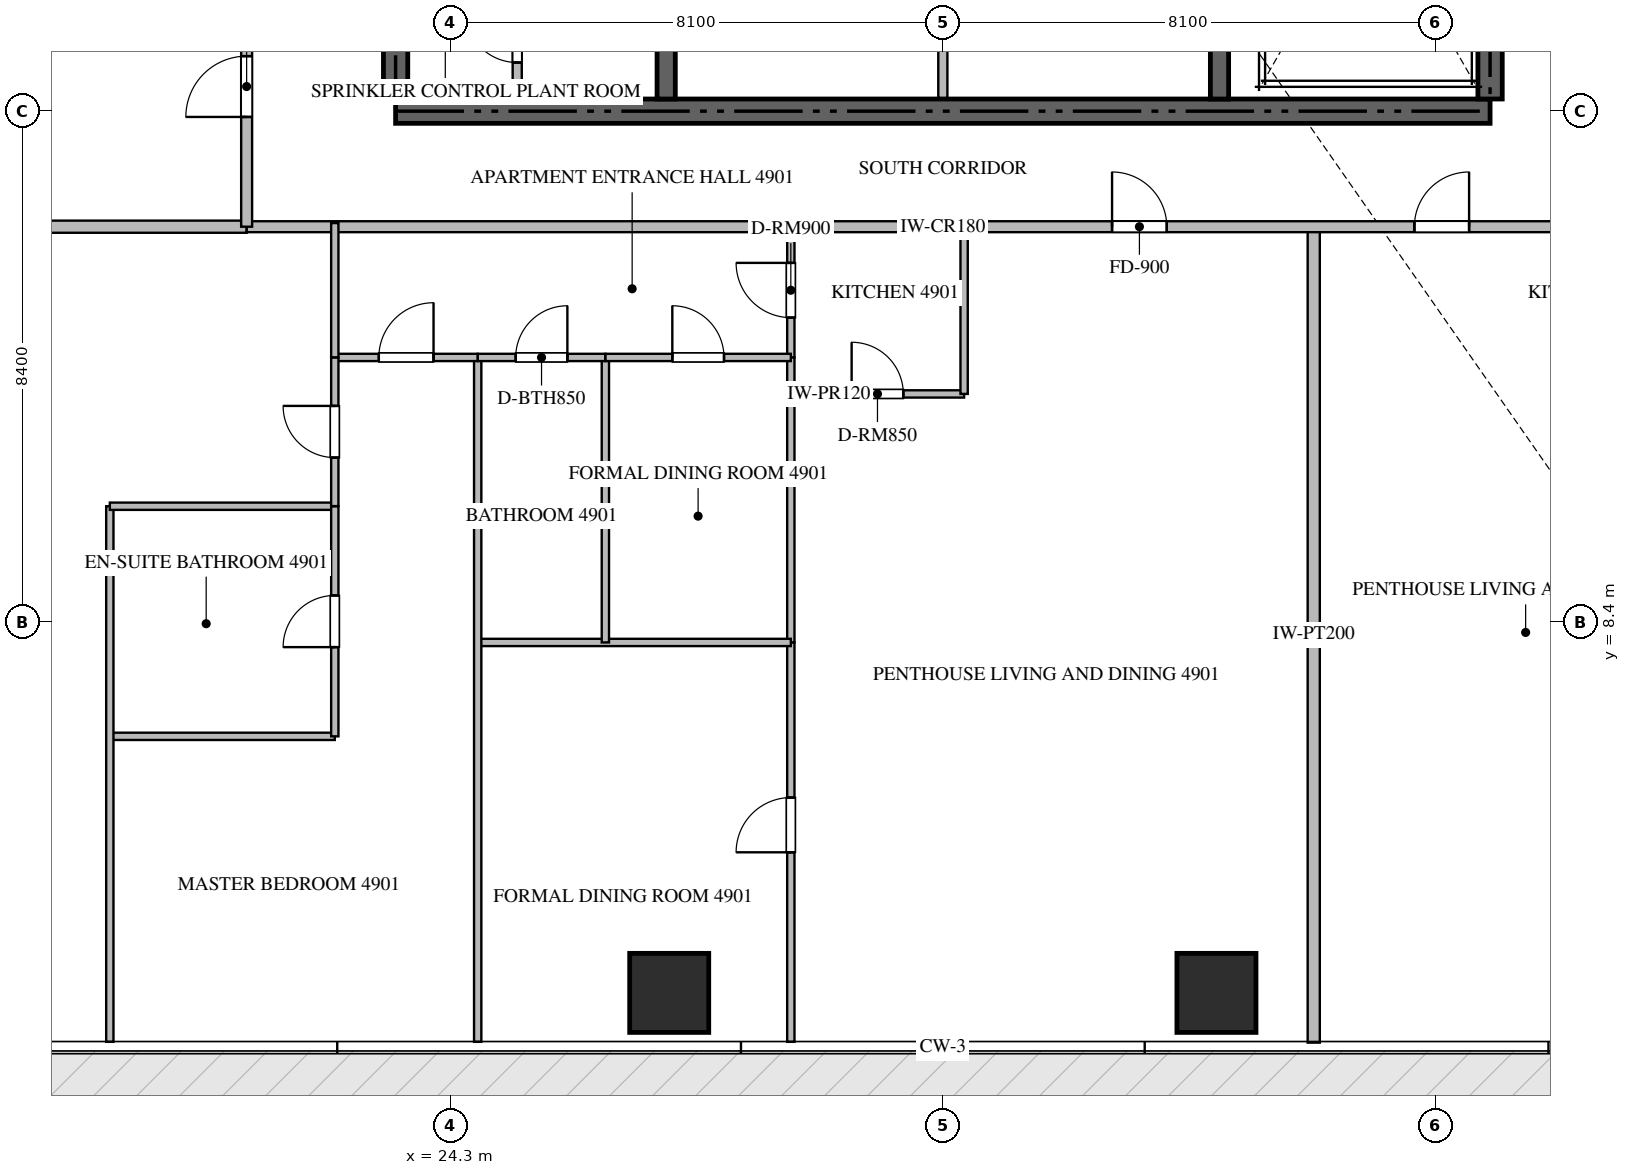
"""IFC4 building model, lengths in metres.
Left out: names, types, materials, properties, quantities, classifications, styles, units other than length and angle.
Written with IfcOpenShell. Run it as: python <this file> out.ifc"""

import sys

from ifc_helpers import new_model, si_unit, direction, frame, frame_2d, origin, origin_2d, place, context, subcontext, project, spatial, rectangle, extrude, source, transform, mapped, element, fill, save


model = new_model("IFC4")
c1 = context("Model", 3, precision=1e-05, world=origin(), true_north=direction((0.0, 1.0)))
c2 = subcontext(c1, "Body", "Model", "MODEL_VIEW")
j1 = project(units=[si_unit("LENGTHUNIT", "METRE"), si_unit("PLANEANGLEUNIT", "RADIAN")], contexts=[c1])
p1 = place(None, origin())
s1 = spatial("IfcSite", under=j1, at=p1, CompositionType="ELEMENT")
p2 = place(p1, origin())
s2 = spatial("IfcBuilding", under=s1, at=p2, CompositionType="ELEMENT")
p3 = place(p2, frame((0.0, 0.0, 195.15)))
s3 = spatial("IfcBuildingStorey", under=s2, at=p3, CompositionType="ELEMENT", Elevation=195.15)
p4 = place(p3, frame((23.4, 16.8, -0.26), z_axis=(0.0, 0.0, 1.0), x_axis=(1.0, 0.0, 0.0)))
e1 = element("IfcWall", 1, at=p4, inside=s3, PredefinedType="SHEAR", context=c2, shape_type="SweptSolid", body=[
    extrude(rectangle(XDim=18.0, YDim=0.4, at=frame_2d((9.0, 0.0))), origin(), (0.0, 0.0, 1.0), 3.568),
])
p5 = place(p3, frame((23.4, 17.0, -0.26), z_axis=(0.0, 0.0, 1.0), x_axis=(0.0, 1.0, 0.0)))
e2 = element("IfcWall", 2, at=p5, inside=s3, PredefinedType="SHEAR", context=c2, shape_type="SweptSolid", body=[
    extrude(rectangle(XDim=4.85, YDim=0.4, at=frame_2d((2.425, 0.0))), origin(), (0.0, 0.0, 1.0), 3.568),
])
p6 = place(p3, frame((41.4, 17.0, -0.26), z_axis=(0.0, 0.0, 1.0), x_axis=(0.0, 1.0, 0.0)))
e3 = element("IfcWall", 3, at=p6, inside=s3, PredefinedType="SHEAR", context=c2, shape_type="SweptSolid", body=[
    extrude(rectangle(XDim=8.35, YDim=0.4, at=frame_2d((4.175, 0.0))), origin(), (0.0, 0.0, 1.0), 3.568),
])
p7 = place(p3, frame((27.85, 17.0, -0.26), z_axis=(0.0, 0.0, 1.0), x_axis=(0.0, 1.0, 0.0)))
e4 = element("IfcWall", 4, at=p7, inside=s3, PredefinedType="SHEAR", context=c2, shape_type="SweptSolid", body=[
    extrude(rectangle(XDim=4.85, YDim=0.3, at=frame_2d((2.425, 0.0))), origin(), (0.0, 0.0, 1.0), 3.568),
])
p8 = place(p3, frame((36.95, 17.0, -0.26), z_axis=(0.0, 0.0, 1.0), x_axis=(0.0, 1.0, 0.0)))
e5 = element("IfcWall", 5, at=p8, inside=s3, PredefinedType="SHEAR", context=c2, shape_type="SweptSolid", body=[
    extrude(rectangle(XDim=8.35, YDim=0.3, at=frame_2d((4.175, 0.0))), origin(), (0.0, 0.0, 1.0), 3.568),
])
m1 = source(origin(), c2, "Body", "SweptSolid", [
    extrude(rectangle(XDim=1.3, YDim=1.3, at=origin_2d()), origin(), (0.0, 0.0, 1.0), 3.57),
])
for number, where, z_axis, x_axis in (
    (6, (27.9, 2.3, -0.26), (0.0, 0.0, 1.0), (1.0, 0.0, 0.0)),
    (7, (36.9, 2.3, -0.26), (0.0, 0.0, 1.0), (1.0, 0.0, 0.0)),
):
    element("IfcColumn", number, at=place(p3, frame(where, z_axis=z_axis, x_axis=x_axis)), inside=s3, PredefinedType="COLUMN", context=c2, shape_type="MappedRepresentation", body=[
        mapped(m1, transform((0.0, 0.0, 0.0), scale=1.0)),
    ])
p9 = place(p3, frame((25.4, 17.0, 0.0), z_axis=(0.0, 0.0, 1.0), x_axis=(0.0, 1.0, 0.0)))
e8 = element("IfcWall", 8, at=p9, inside=s3, PredefinedType="PARTITIONING", context=c2, shape_type="SweptSolid", body=[
    extrude(rectangle(XDim=2.05, YDim=0.15, at=frame_2d((1.025, 0.0))), origin(), (0.0, 0.0, 1.0), 3.31),
])
p10 = place(p9, frame((0.6, 0.0, 0.0)))
e9 = element("IfcOpeningElement", 9, at=p10, cuts=e8, PredefinedType="OPENING", context=c2, shape_type="SweptSolid", body=[
    extrude(rectangle(XDim=0.85, YDim=2.1, at=frame_2d((0.425, 1.05))), frame((0.0, 0.085, 0.0), z_axis=(0.0, -1.0, 0.0), x_axis=(1.0, 0.0, 0.0)), (0.0, 0.0, 1.0), 0.17),
])
p11 = place(p3, frame((32.4, 17.02, 0.0), z_axis=(0.0, 0.0, 1.0), x_axis=(0.0, 1.0, 0.0)))
e10 = element("IfcWall", 10, at=p11, inside=s3, PredefinedType="PARTITIONING", context=c2, shape_type="SweptSolid", body=[
    extrude(rectangle(XDim=2.73, YDim=0.15, at=frame_2d((1.365, 0.0))), origin(), (0.0, 0.0, 1.0), 3.31),
])
p12 = place(p3, frame((38.5, 1.482, 0.0), z_axis=(0.0, 0.0, 1.0), x_axis=(0.0, 1.0, 0.0)))
e11 = element("IfcWall", 11, at=p12, inside=s3, PredefinedType="PARTITIONING", context=c2, shape_type="SweptSolid", body=[
    extrude(rectangle(XDim=13.418, YDim=0.2, at=frame_2d((6.709, 0.0))), origin(), (0.0, 0.0, 1.0), 3.31),
])
p13 = place(p3, frame((7.882, 14.9, 0.0), z_axis=(0.0, 0.0, 1.0), x_axis=(1.0, 0.0, 0.0)))
e12 = element("IfcWall", 12, at=p13, inside=s3, PredefinedType="PARTITIONING", context=c2, shape_type="SweptSolid", body=[
    extrude(rectangle(XDim=13.068, YDim=0.2, at=frame_2d((6.534, 0.0))), origin(), (0.0, 0.0, 1.0), 3.31),
])
p14 = place(p3, frame((20.952, 14.9, 0.0), z_axis=(0.0, 0.0, 1.0), x_axis=(1.0, 0.0, 0.0)))
e13 = element("IfcWall", 13, at=p14, inside=s3, PredefinedType="PARTITIONING", context=c2, shape_type="SweptSolid", body=[
    extrude(rectangle(XDim=22.896, YDim=0.18, at=frame_2d((11.448, 0.0))), origin(), (0.0, 0.0, 1.0), 2.145),
])
p15 = place(p14, frame((14.231, 0.0, 0.0)))
e14 = element("IfcOpeningElement", 14, at=p15, cuts=e13, PredefinedType="OPENING", context=c2, shape_type="SweptSolid", body=[
    extrude(rectangle(XDim=0.9, YDim=2.1, at=frame_2d((0.45, 1.05))), frame((0.0, 0.1, 0.0), z_axis=(0.0, -1.0, 0.0), x_axis=(1.0, 0.0, 0.0)), (0.0, 0.0, 1.0), 0.2),
])
p16 = place(p14, frame((19.203, 0.0, 0.0)))
e15 = element("IfcOpeningElement", 15, at=p16, cuts=e13, PredefinedType="OPENING", context=c2, shape_type="SweptSolid", body=[
    extrude(rectangle(XDim=0.9, YDim=2.1, at=frame_2d((0.45, 1.05))), frame((0.0, 0.1, 0.0), z_axis=(0.0, -1.0, 0.0), x_axis=(1.0, 0.0, 0.0)), (0.0, 0.0, 1.0), 0.2),
])
p17 = place(p3, frame((20.95, 14.9, 0.0), z_axis=(0.0, 0.0, 1.0), x_axis=(0.0, 1.0, 0.0)))
e16 = element("IfcWall", 16, at=p17, inside=s3, PredefinedType="PARTITIONING", context=c2, shape_type="SweptSolid", body=[
    extrude(rectangle(XDim=18.7, YDim=0.18, at=frame_2d((9.35, 0.0))), origin(), (0.0, 0.0, 1.0), 3.31),
])
p18 = place(p17, frame((1.805, 0.0, 0.0)))
e17 = element("IfcOpeningElement", 17, at=p18, cuts=e16, PredefinedType="OPENING", context=c2, shape_type="SweptSolid", body=[
    extrude(rectangle(XDim=1.0, YDim=2.15, at=frame_2d((0.5, 1.075))), frame((0.0, 0.1, 0.0), z_axis=(0.0, -1.0, 0.0), x_axis=(1.0, 0.0, 0.0)), (0.0, 0.0, 1.0), 0.2),
])
p19 = place(p17, frame((10.602, 0.0, 0.0)))
e18 = element("IfcOpeningElement", 18, at=p19, cuts=e16, PredefinedType="OPENING", context=c2, shape_type="SweptSolid", body=[
    extrude(rectangle(XDim=1.0, YDim=2.15, at=frame_2d((0.5, 1.075))), frame((0.0, 0.1, 0.0), z_axis=(0.0, -1.0, 0.0), x_axis=(1.0, 0.0, 0.0)), (0.0, 0.0, 1.0), 0.2),
])
p20 = place(p3, frame((29.9, 12.15, 0.0), z_axis=(0.0, 0.0, 1.0), x_axis=(1.0, 0.0, 0.0)))
e19 = element("IfcWall", 19, at=p20, inside=s3, PredefinedType="PARTITIONING", context=c2, shape_type="SweptSolid", body=[
    extrude(rectangle(XDim=2.85, YDim=0.12, at=frame_2d((1.425, 0.0))), origin(), (0.0, 0.0, 1.0), 3.31),
])
p21 = place(p20, frame((1.0, 0.0, 0.0)))
e20 = element("IfcOpeningElement", 20, at=p21, cuts=e19, PredefinedType="OPENING", context=c2, shape_type="SweptSolid", body=[
    extrude(rectangle(XDim=0.85, YDim=2.1, at=frame_2d((0.425, 1.05))), frame((0.0, 0.07, 0.0), z_axis=(0.0, -1.0, 0.0), x_axis=(1.0, 0.0, 0.0)), (0.0, 0.0, 1.0), 0.14),
])
p22 = place(p3, frame((32.75, 12.15, 0.0), z_axis=(0.0, 0.0, 1.0), x_axis=(0.0, 1.0, 0.0)))
e21 = element("IfcWall", 21, at=p22, inside=s3, PredefinedType="PARTITIONING", context=c2, shape_type="SweptSolid", body=[
    extrude(rectangle(XDim=2.81, YDim=0.12, at=frame_2d((1.405, 0.0))), origin(), (0.0, 0.0, 1.0), 3.31),
])
p23 = place(p3, frame((29.9, 12.75, 0.0), z_axis=(0.0, 0.0, 1.0), x_axis=(0.0, 1.0, 0.0)))
e22 = element("IfcWall", 22, at=p23, inside=s3, PredefinedType="PARTITIONING", context=c2, shape_type="SweptSolid", body=[
    extrude(rectangle(XDim=2.21, YDim=0.12, at=frame_2d((1.105, 0.0))), origin(), (0.0, 0.0, 1.0), 3.31),
])
p24 = place(p23, frame((0.655, 0.0, 0.0)))
e23 = element("IfcOpeningElement", 23, at=p24, cuts=e22, PredefinedType="OPENING", context=c2, shape_type="SweptSolid", body=[
    extrude(rectangle(XDim=0.9, YDim=2.1, at=frame_2d((0.45, 1.05))), frame((0.0, 0.07, 0.0), z_axis=(0.0, -1.0, 0.0), x_axis=(1.0, 0.0, 0.0)), (0.0, 0.0, 1.0), 0.14),
])
p25 = place(p3, frame((29.9, 1.495, 0.0), z_axis=(0.0, 0.0, 1.0), x_axis=(0.0, 1.0, 0.0)))
e24 = element("IfcWall", 24, at=p25, inside=s3, PredefinedType="PARTITIONING", context=c2, shape_type="SweptSolid", body=[
    extrude(rectangle(XDim=6.568, YDim=0.12, at=frame_2d((3.284, 0.0))), origin(), (0.0, 0.0, 1.0), 3.31),
])
p26 = place(p25, frame((3.117, 0.0, 0.0)))
e25 = element("IfcOpeningElement", 25, at=p26, cuts=e24, PredefinedType="OPENING", context=c2, shape_type="SweptSolid", body=[
    extrude(rectangle(XDim=0.9, YDim=2.1, at=frame_2d((0.45, 1.05))), frame((0.0, 0.07, 0.0), z_axis=(0.0, -1.0, 0.0), x_axis=(1.0, 0.0, 0.0)), (0.0, 0.0, 1.0), 0.14),
])
p27 = place(p3, frame((29.9, 8.065, 0.0), z_axis=(0.0, 0.0, 1.0), x_axis=(0.0, 1.0, 0.0)))
e26 = element("IfcWall", 26, at=p27, inside=s3, PredefinedType="PARTITIONING", context=c2, shape_type="SweptSolid", body=[
    extrude(rectangle(XDim=4.683, YDim=0.12, at=frame_2d((2.342, 0.0))), origin(), (0.0, 0.0, 1.0), 3.31),
])
p28 = place(p3, frame((24.75, 8.063, 0.0), z_axis=(0.0, 0.0, 1.0), x_axis=(1.0, 0.0, 0.0)))
e27 = element("IfcWall", 27, at=p28, inside=s3, PredefinedType="PARTITIONING", context=c2, shape_type="SweptSolid", body=[
    extrude(rectangle(XDim=5.15, YDim=0.12, at=frame_2d((2.575, 0.0))), origin(), (0.0, 0.0, 1.0), 3.31),
])
p29 = place(p3, frame((24.75, 1.495, 0.0), z_axis=(0.0, 0.0, 1.0), x_axis=(0.0, 1.0, 0.0)))
e28 = element("IfcWall", 28, at=p29, inside=s3, PredefinedType="PARTITIONING", context=c2, shape_type="SweptSolid", body=[
    extrude(rectangle(XDim=11.255, YDim=0.12, at=frame_2d((5.627, 0.0))), origin(), (0.0, 0.0, 1.0), 3.31),
])
p30 = place(p3, frame((26.85, 8.063, 0.0), z_axis=(0.0, 0.0, 1.0), x_axis=(0.0, 1.0, 0.0)))
e29 = element("IfcWall", 29, at=p30, inside=s3, PredefinedType="PARTITIONING", context=c2, shape_type="SweptSolid", body=[
    extrude(rectangle(XDim=4.687, YDim=0.12, at=frame_2d((2.344, 0.0))), origin(), (0.0, 0.0, 1.0), 3.31),
])
p31 = place(p3, frame((24.75, 12.75, 0.0), z_axis=(0.0, 0.0, 1.0), x_axis=(1.0, 0.0, 0.0)))
e30 = element("IfcWall", 30, at=p31, inside=s3, PredefinedType="PARTITIONING", context=c2, shape_type="SweptSolid", body=[
    extrude(rectangle(XDim=2.1, YDim=0.12, at=frame_2d((1.05, 0.0))), origin(), (0.0, 0.0, 1.0), 3.31),
])
p32 = place(p31, frame((0.625, 0.0, 0.0)))
e31 = element("IfcOpeningElement", 31, at=p32, cuts=e30, PredefinedType="OPENING", context=c2, shape_type="SweptSolid", body=[
    extrude(rectangle(XDim=0.85, YDim=2.1, at=frame_2d((0.425, 1.05))), frame((0.0, 0.07, 0.0), z_axis=(0.0, -1.0, 0.0), x_axis=(1.0, 0.0, 0.0)), (0.0, 0.0, 1.0), 0.14),
])
p33 = place(p3, frame((26.852, 12.75, 0.0), z_axis=(0.0, 0.0, 1.0), x_axis=(1.0, 0.0, 0.0)))
e32 = element("IfcWall", 32, at=p33, inside=s3, PredefinedType="PARTITIONING", context=c2, shape_type="SweptSolid", body=[
    extrude(rectangle(XDim=3.048, YDim=0.12, at=frame_2d((1.524, 0.0))), origin(), (0.0, 0.0, 1.0), 3.31),
])
p34 = place(p33, frame((1.099, 0.0, 0.0)))
e33 = element("IfcOpeningElement", 33, at=p34, cuts=e32, PredefinedType="OPENING", context=c2, shape_type="SweptSolid", body=[
    extrude(rectangle(XDim=0.85, YDim=2.1, at=frame_2d((0.425, 1.05))), frame((0.0, 0.07, 0.0), z_axis=(0.0, -1.0, 0.0), x_axis=(1.0, 0.0, 0.0)), (0.0, 0.0, 1.0), 0.14),
])
p35 = place(p3, frame((22.4, 12.75, 0.0), z_axis=(0.0, 0.0, 1.0), x_axis=(1.0, 0.0, 0.0)))
e34 = element("IfcWall", 34, at=p35, inside=s3, PredefinedType="PARTITIONING", context=c2, shape_type="SweptSolid", body=[
    extrude(rectangle(XDim=2.348, YDim=0.12, at=frame_2d((1.174, 0.0))), origin(), (0.0, 0.0, 1.0), 3.31),
])
p36 = place(p35, frame((0.724, 0.0, 0.0)))
e35 = element("IfcOpeningElement", 35, at=p36, cuts=e34, PredefinedType="OPENING", context=c2, shape_type="SweptSolid", body=[
    extrude(rectangle(XDim=0.9, YDim=2.1, at=frame_2d((0.45, 1.05))), frame((0.0, 0.07, 0.0), z_axis=(0.0, -1.0, 0.0), x_axis=(1.0, 0.0, 0.0)), (0.0, 0.0, 1.0), 0.14),
])
p37 = place(p3, frame((18.7, 6.519, 0.0), z_axis=(0.0, 0.0, 1.0), x_axis=(1.0, 0.0, 0.0)))
e36 = element("IfcWall", 36, at=p37, inside=s3, PredefinedType="PARTITIONING", context=c2, shape_type="SweptSolid", body=[
    extrude(rectangle(XDim=3.7, YDim=0.12, at=frame_2d((1.85, 0.0))), origin(), (0.0, 0.0, 1.0), 3.31),
])
p38 = place(p3, frame((18.7, 1.495, 0.0), z_axis=(0.0, 0.0, 1.0), x_axis=(0.0, 1.0, 0.0)))
e37 = element("IfcWall", 37, at=p38, inside=s3, PredefinedType="PARTITIONING", context=c2, shape_type="SweptSolid", body=[
    extrude(rectangle(XDim=8.808, YDim=0.12, at=frame_2d((4.404, 0.0))), origin(), (0.0, 0.0, 1.0), 3.31),
])
p39 = place(p3, frame((18.7, 10.303, 0.0), z_axis=(0.0, 0.0, 1.0), x_axis=(1.0, 0.0, 0.0)))
e38 = element("IfcWall", 38, at=p39, inside=s3, PredefinedType="PARTITIONING", context=c2, shape_type="SweptSolid", body=[
    extrude(rectangle(XDim=3.7, YDim=0.12, at=frame_2d((1.85, 0.0))), origin(), (0.0, 0.0, 1.0), 2.145),
])
p40 = place(p3, frame((22.4, 6.519, 0.0), z_axis=(0.0, 0.0, 1.0), x_axis=(0.0, 1.0, 0.0)))
e39 = element("IfcWall", 39, at=p40, inside=s3, PredefinedType="PARTITIONING", context=c2, shape_type="SweptSolid", body=[
    extrude(rectangle(XDim=3.784, YDim=0.12, at=frame_2d((1.892, 0.0))), origin(), (0.0, 0.0, 1.0), 3.31),
])
p41 = place(p40, frame((1.467, 0.0, 0.0)))
e40 = element("IfcOpeningElement", 40, at=p41, cuts=e39, PredefinedType="OPENING", context=c2, shape_type="SweptSolid", body=[
    extrude(rectangle(XDim=0.85, YDim=2.1, at=frame_2d((0.425, 1.05))), frame((0.0, 0.07, 0.0), z_axis=(0.0, -1.0, 0.0), x_axis=(1.0, 0.0, 0.0)), (0.0, 0.0, 1.0), 0.14),
])
p42 = place(p3, frame((22.4, 10.305, 0.0), z_axis=(0.0, 0.0, 1.0), x_axis=(0.0, 1.0, 0.0)))
e41 = element("IfcWall", 41, at=p42, inside=s3, PredefinedType="PARTITIONING", context=c2, shape_type="SweptSolid", body=[
    extrude(rectangle(XDim=2.445, YDim=0.12, at=frame_2d((1.223, 0.0))), origin(), (0.0, 0.0, 1.0), 3.31),
])
p43 = place(p42, frame((0.798, 0.0, 0.0)))
e42 = element("IfcOpeningElement", 42, at=p43, cuts=e41, PredefinedType="OPENING", context=c2, shape_type="SweptSolid", body=[
    extrude(rectangle(XDim=0.85, YDim=2.1, at=frame_2d((0.425, 1.05))), frame((0.0, 0.07, 0.0), z_axis=(0.0, -1.0, 0.0), x_axis=(1.0, 0.0, 0.0)), (0.0, 0.0, 1.0), 0.14),
])
p44 = place(p3, frame((22.4, 12.752, 0.0), z_axis=(0.0, 0.0, 1.0), x_axis=(0.0, 1.0, 0.0)))
e43 = element("IfcWall", 43, at=p44, inside=s3, PredefinedType="PARTITIONING", context=c2, shape_type="SweptSolid", body=[
    extrude(rectangle(XDim=2.208, YDim=0.12, at=frame_2d((1.104, 0.0))), origin(), (0.0, 0.0, 1.0), 3.31),
])
m2 = source(origin(), c2, "Body", "SweptSolid", [
    extrude(rectangle(XDim=0.85, YDim=2.1, at=frame_2d((0.425, 1.05))), frame((0.0, 0.025, 0.0), z_axis=(0.0, -1.0, 0.0), x_axis=(1.0, 0.0, 0.0)), (0.0, 0.0, 1.0), 0.05),
])
p45 = place(p10, origin())
e44 = element("IfcDoor", 44, at=p45, inside=s3, OperationType="SINGLE_SWING_RIGHT", PredefinedType="DOOR", context=c2, shape_type="MappedRepresentation", body=[
    mapped(m2, transform((0.0, 0.0, 0.0), scale=1.0)),
])
fill(e9, e44)
m3 = source(origin(), c2, "Body", "SweptSolid", [
    extrude(rectangle(XDim=0.9, YDim=2.1, at=frame_2d((0.45, 1.05))), frame((0.0, 0.025, 0.0), z_axis=(0.0, -1.0, 0.0), x_axis=(1.0, 0.0, 0.0)), (0.0, 0.0, 1.0), 0.05),
])
p46 = place(p15, origin())
e45 = element("IfcDoor", 45, at=p46, inside=s3, OperationType="SINGLE_SWING_LEFT", PredefinedType="DOOR", context=c2, shape_type="MappedRepresentation", body=[
    mapped(m3, transform((0.0, 0.0, 0.0), scale=1.0)),
])
fill(e14, e45)
p47 = place(p16, origin())
e46 = element("IfcDoor", 46, at=p47, inside=s3, OperationType="SINGLE_SWING_RIGHT", PredefinedType="DOOR", context=c2, shape_type="MappedRepresentation", body=[
    mapped(m3, transform((0.0, 0.0, 0.0), scale=1.0)),
])
fill(e15, e46)
m4 = source(origin(), c2, "Body", "SweptSolid", [
    extrude(rectangle(XDim=1.0, YDim=2.15, at=frame_2d((0.5, 1.075))), frame((0.0, 0.025, 0.0), z_axis=(0.0, -1.0, 0.0), x_axis=(1.0, 0.0, 0.0)), (0.0, 0.0, 1.0), 0.05),
])
p48 = place(p18, origin())
e47 = element("IfcDoor", 47, at=p48, inside=s3, OperationType="SINGLE_SWING_LEFT", PredefinedType="DOOR", context=c2, shape_type="MappedRepresentation", body=[
    mapped(m4, transform((0.0, 0.0, 0.0), scale=1.0)),
])
fill(e17, e47)
p49 = place(p21, origin())
e48 = element("IfcDoor", 48, at=p49, inside=s3, OperationType="SINGLE_SWING_LEFT", PredefinedType="DOOR", context=c2, shape_type="MappedRepresentation", body=[
    mapped(m2, transform((0.0, 0.0, 0.0), scale=1.0)),
])
fill(e20, e48)
p50 = place(p24, origin())
e49 = element("IfcDoor", 49, at=p50, inside=s3, OperationType="SINGLE_SWING_RIGHT", PredefinedType="DOOR", context=c2, shape_type="MappedRepresentation", body=[
    mapped(m3, transform((0.0, 0.0, 0.0), scale=1.0)),
])
fill(e23, e49)
p51 = place(p26, origin())
e50 = element("IfcDoor", 50, at=p51, inside=s3, OperationType="SINGLE_SWING_LEFT", PredefinedType="DOOR", context=c2, shape_type="MappedRepresentation", body=[
    mapped(m3, transform((0.0, 0.0, 0.0), scale=1.0)),
])
fill(e25, e50)
p52 = place(p32, origin())
e51 = element("IfcDoor", 51, at=p52, inside=s3, OperationType="SINGLE_SWING_RIGHT", PredefinedType="DOOR", context=c2, shape_type="MappedRepresentation", body=[
    mapped(m2, transform((0.0, 0.0, 0.0), scale=1.0)),
])
fill(e31, e51)
p53 = place(p34, origin())
e52 = element("IfcDoor", 52, at=p53, inside=s3, OperationType="SINGLE_SWING_LEFT", PredefinedType="DOOR", context=c2, shape_type="MappedRepresentation", body=[
    mapped(m2, transform((0.0, 0.0, 0.0), scale=1.0)),
])
fill(e33, e52)
p54 = place(p36, origin())
e53 = element("IfcDoor", 53, at=p54, inside=s3, OperationType="SINGLE_SWING_RIGHT", PredefinedType="DOOR", context=c2, shape_type="MappedRepresentation", body=[
    mapped(m3, transform((0.0, 0.0, 0.0), scale=1.0)),
])
fill(e35, e53)
p55 = place(p41, origin())
e54 = element("IfcDoor", 54, at=p55, inside=s3, OperationType="SINGLE_SWING_LEFT", PredefinedType="DOOR", context=c2, shape_type="MappedRepresentation", body=[
    mapped(m2, transform((0.0, 0.0, 0.0), scale=1.0)),
])
fill(e40, e54)
p56 = place(p43, origin())
e55 = element("IfcDoor", 55, at=p56, inside=s3, OperationType="SINGLE_SWING_RIGHT", PredefinedType="DOOR", context=c2, shape_type="MappedRepresentation", body=[
    mapped(m2, transform((0.0, 0.0, 0.0), scale=1.0)),
])
fill(e42, e55)
save(model, sys.argv[1])
